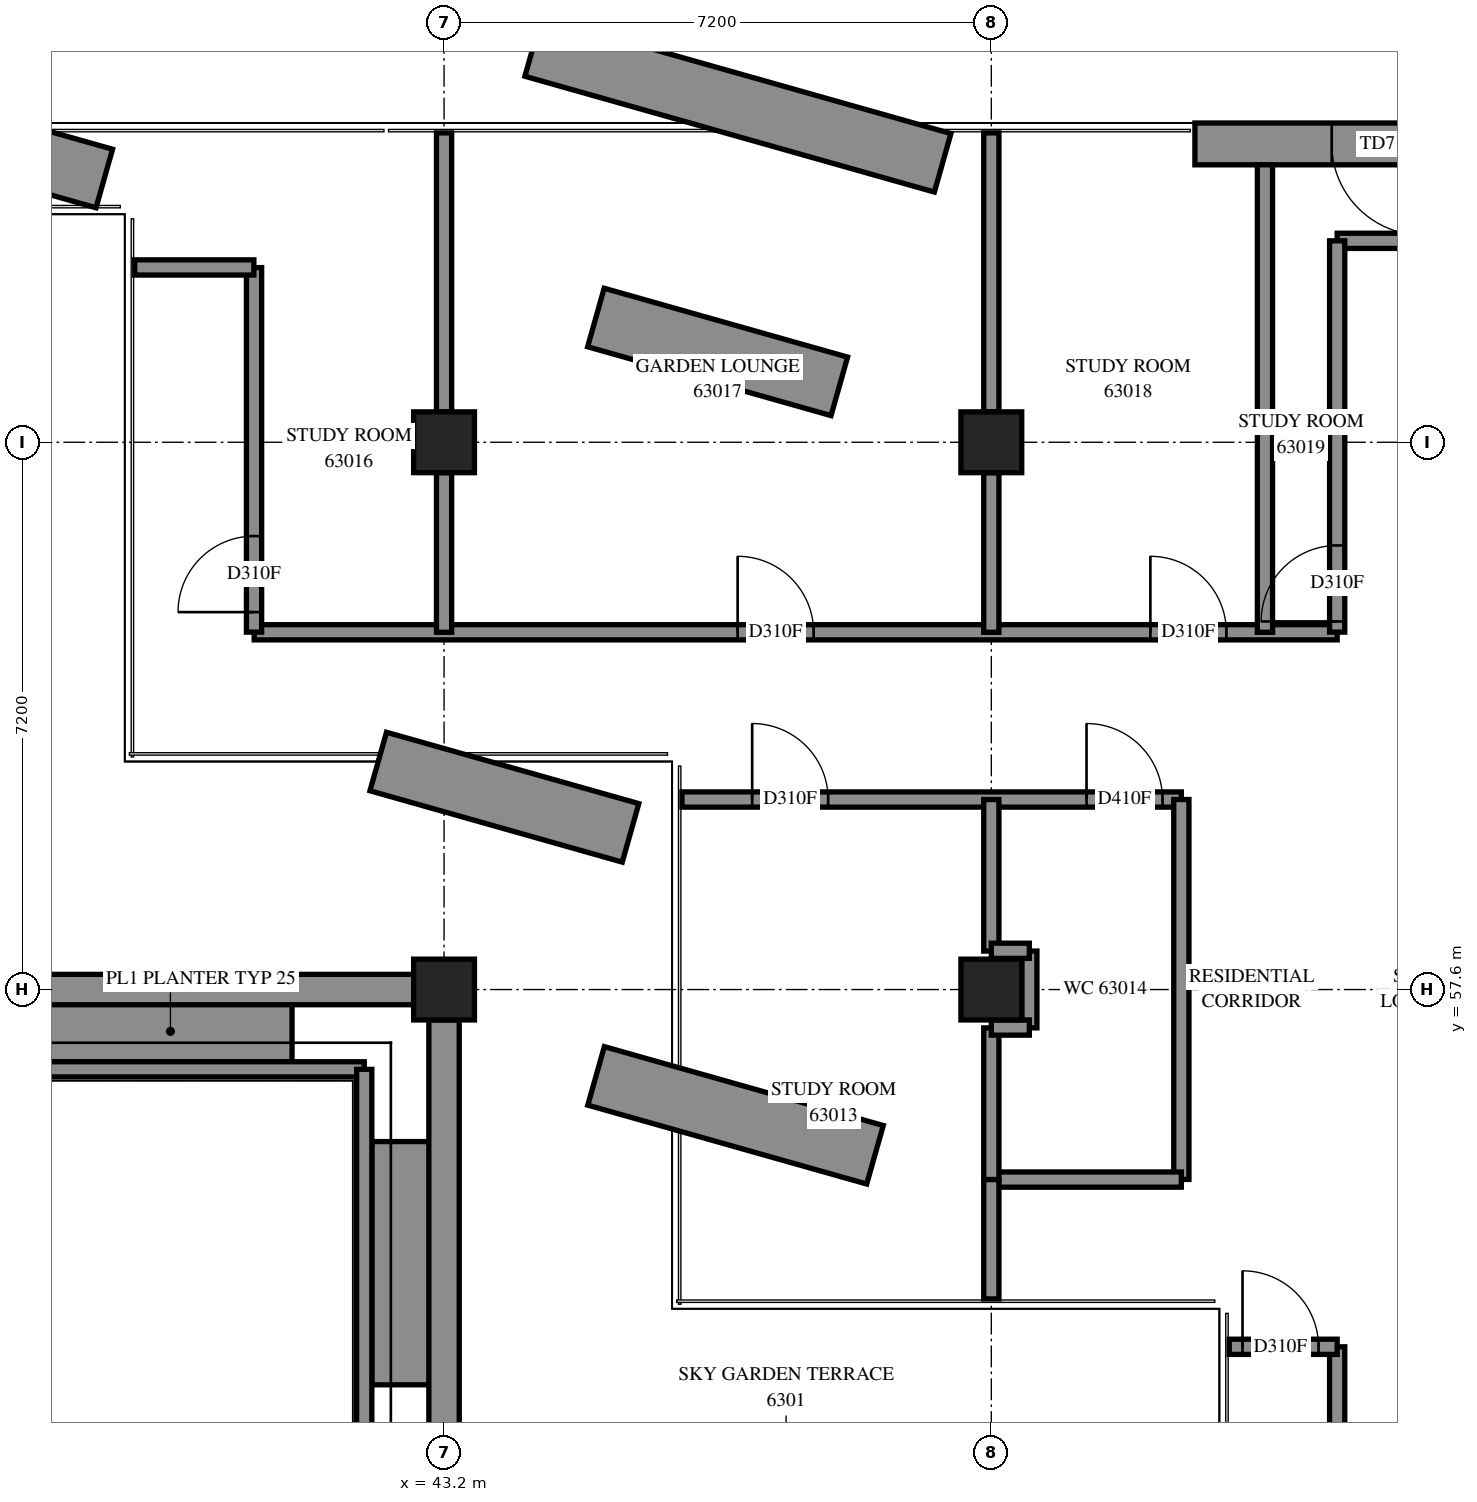
"""IFC4 building model, lengths in metres.
Left out: names, types, materials, properties, quantities, classifications, styles, units other than length and angle.
Written with IfcOpenShell. Run it as: python <this file> out.ifc"""

import sys

from ifc_helpers import new_model, si_unit, direction, frame, frame_2d, origin, origin_2d, place, context, subcontext, project, spatial, polyline, rectangle, outline, extrude, element, fill, save


model = new_model("IFC4")
c1 = context("Model", 3, precision=1e-05, world=origin(), true_north=direction((0.0, 1.0)))
c2 = subcontext(c1, "Body", "Model", "MODEL_VIEW")
j1 = project(units=[si_unit("LENGTHUNIT", "METRE"), si_unit("PLANEANGLEUNIT", "RADIAN")], contexts=[c1])
p1 = place(None, origin())
s1 = spatial("IfcSite", under=j1, at=p1, CompositionType="ELEMENT")
p2 = place(p1, origin())
s2 = spatial("IfcBuilding", under=s1, at=p2, CompositionType="ELEMENT")
p3 = place(p2, frame((0.0, 0.0, 230.4)))
s3 = spatial("IfcBuildingStorey", under=s2, at=p3, CompositionType="ELEMENT", Elevation=230.4)
for number, where, z_axis, x_axis in (
    (1, (43.2, 57.6, 0.0), (0.0, 0.0, 1.0), (1.0, 0.0, 0.0)),
    (2, (43.2, 64.8, 0.0), (0.0, 0.0, 1.0), (1.0, 0.0, 0.0)),
    (3, (50.4, 57.6, 0.0), (0.0, 0.0, 1.0), (1.0, 0.0, 0.0)),
    (4, (50.4, 64.8, 0.0), (0.0, 0.0, 1.0), (1.0, 0.0, 0.0)),
):
    element("IfcColumn", number, at=place(p3, frame(where, z_axis=z_axis, x_axis=x_axis)), inside=s3, PredefinedType="COLUMN", context=c2, shape_type="SweptSolid", body=[
        extrude(rectangle(XDim=0.8, YDim=0.8, at=origin_2d()), origin(), (0.0, 0.0, 1.0), 3.9),
    ])
p4 = place(p3, frame((56.678, 68.725, 0.0), z_axis=(0.0, 0.0, 1.0), x_axis=(-1.0, 0.0, 0.0)))
e5 = element("IfcWall", 5, at=p4, inside=s3, PredefinedType="SOLIDWALL", context=c2, shape_type="SweptSolid", body=[
    extrude(rectangle(XDim=3.6, YDim=0.55, at=frame_2d((1.8, 0.0))), origin(), (0.0, 0.0, 1.0), 3.9),
])
p5 = place(p4, frame((0.6, 0.0, 0.0)))
e6 = element("IfcOpeningElement", 6, at=p5, cuts=e5, PredefinedType="OPENING", context=c2, shape_type="SweptSolid", body=[
    extrude(rectangle(XDim=1.2, YDim=2.4, at=frame_2d((0.6, 1.2))), frame((0.0, 0.285, 0.0), z_axis=(0.0, -1.0, 0.0), x_axis=(1.0, 0.0, 0.0)), (0.0, 0.0, 1.0), 0.57),
])
for number, where, z_axis, x_axis in (
    (7, (38.0, 57.05, 0.0), (0.0, 0.0, 1.0), (1.0, 0.0, 0.0)),
    (8, (42.65, 55.6, 0.0), (0.0, 0.0, 1.0), (0.0, -1.0, 0.0)),
):
    element("IfcWall", number, at=place(p3, frame(where, z_axis=z_axis, x_axis=x_axis)), inside=s3, PredefinedType="SOLIDWALL", context=c2, shape_type="SweptSolid", body=[
        extrude(rectangle(XDim=3.2, YDim=0.8, at=frame_2d((1.6, 0.0))), origin(), (0.0, 0.0, 1.0), 0.65),
    ])
p6 = place(p3, frame((49.76, 68.477, 0.0), z_axis=(0.0, 0.0, 1.0), x_axis=(-0.9622632511, 0.2721202593, 0.0)))
e9 = element("IfcWall", 9, at=p6, inside=s3, PredefinedType="SOLIDWALL", context=c2, shape_type="SweptSolid", body=[
    extrude(rectangle(XDim=5.598, YDim=0.8, at=frame_2d((2.799, 0.0))), origin(), (0.0, 0.0, 1.0), 0.65),
])
p7 = place(p3, frame((38.73, 68.27, 0.0), z_axis=(0.0, 0.0, 1.0), x_axis=(-0.9622613389, 0.2721270213, 0.0)))
e10 = element("IfcWall", 10, at=p7, inside=s3, PredefinedType="SOLIDWALL", context=c2, shape_type="SweptSolid", body=[
    extrude(rectangle(XDim=8.241, YDim=0.8, at=frame_2d((4.12, 0.0))), origin(), (0.0, 0.0, 1.0), 0.65),
])
p8 = place(p3, frame((45.653, 59.661, 0.0), z_axis=(0.0, 0.0, 1.0), x_axis=(-0.962261063, 0.2721279968, 0.0)))
e11 = element("IfcWall", 11, at=p8, inside=s3, PredefinedType="SOLIDWALL", context=c2, shape_type="SweptSolid", body=[
    extrude(rectangle(XDim=3.45, YDim=0.8, at=frame_2d((1.725, 0.0))), origin(), (0.0, 0.0, 1.0), 0.65),
])
p9 = place(p3, frame((34.95, 56.55, 0.0), z_axis=(0.0, 0.0, 1.0), x_axis=(1.0, 0.0, 0.0)))
e12 = element("IfcWall", 12, at=p9, inside=s3, PredefinedType="SOLIDWALL", context=c2, shape_type="SweptSolid", body=[
    extrude(outline(polyline([(-0.1, -0.1), (7.1, -0.1), (7.3, 0.1), (0.1, 0.1), (-0.1, -0.1)])), origin(), (0.0, 0.0, 1.0), 4.2),
])
p10 = place(p3, frame((42.15, 56.55, 0.0), z_axis=(0.0, 0.0, 1.0), x_axis=(0.0, -1.0, 0.0)))
e13 = element("IfcWall", 13, at=p10, inside=s3, PredefinedType="SOLIDWALL", context=c2, shape_type="SweptSolid", body=[
    extrude(outline(polyline([(0.1, -0.1), (7.3, -0.1), (7.1, 0.1), (-0.1, 0.1), (0.1, -0.1)])), origin(), (0.0, 0.0, 1.0), 4.2),
])
p11 = place(p3, frame((54.95, 67.45, 0.0), z_axis=(0.0, 0.0, 1.0), x_axis=(1.0, 0.0, 0.0)))
e14 = element("IfcWall", 14, at=p11, inside=s3, PredefinedType="PARTITIONING", context=c2, shape_type="SweptSolid", body=[
    extrude(rectangle(XDim=19.7, YDim=0.2, at=frame_2d((9.85, 0.0))), origin(), (0.0, 0.0, 1.0), 3.9),
])
p12 = place(p11, frame((6.513, 0.0, 0.0)))
e15 = element("IfcOpeningElement", 15, at=p12, cuts=e14, PredefinedType="OPENING", context=c2, shape_type="SweptSolid", body=[
    extrude(rectangle(XDim=1.0, YDim=2.1, at=frame_2d((0.5, 1.05))), frame((0.0, 0.11, 0.0), z_axis=(0.0, -1.0, 0.0), x_axis=(1.0, 0.0, 0.0)), (0.0, 0.0, 1.0), 0.22),
])
p13 = place(p11, frame((13.713, 0.0, 0.0)))
e16 = element("IfcOpeningElement", 16, at=p13, cuts=e14, PredefinedType="OPENING", context=c2, shape_type="SweptSolid", body=[
    extrude(rectangle(XDim=1.0, YDim=2.1, at=frame_2d((0.5, 1.05))), frame((0.0, 0.11, 0.0), z_axis=(0.0, -1.0, 0.0), x_axis=(1.0, 0.0, 0.0)), (0.0, 0.0, 1.0), 0.22),
])
p14 = place(p3, frame((40.702, 62.3, 0.0), z_axis=(0.0, 0.0, 1.0), x_axis=(1.0, 0.0, 0.0)))
e17 = element("IfcWall", 17, at=p14, inside=s3, PredefinedType="PARTITIONING", context=c2, shape_type="SweptSolid", body=[
    extrude(rectangle(XDim=14.248, YDim=0.2, at=frame_2d((7.124, 0.0))), origin(), (0.0, 0.0, 1.0), 3.9),
])
p15 = place(p14, frame((6.361, 0.0, 0.0)))
e18 = element("IfcOpeningElement", 18, at=p15, cuts=e17, PredefinedType="OPENING", context=c2, shape_type="SweptSolid", body=[
    extrude(rectangle(XDim=1.0, YDim=2.1, at=frame_2d((0.5, 1.05))), frame((0.0, 0.11, 0.0), z_axis=(0.0, -1.0, 0.0), x_axis=(1.0, 0.0, 0.0)), (0.0, 0.0, 1.0), 0.22),
])
p16 = place(p14, frame((11.79, 0.0, 0.0)))
e19 = element("IfcOpeningElement", 19, at=p16, cuts=e17, PredefinedType="OPENING", context=c2, shape_type="SweptSolid", body=[
    extrude(rectangle(XDim=1.0, YDim=2.1, at=frame_2d((0.5, 1.05))), frame((0.0, 0.11, 0.0), z_axis=(0.0, -1.0, 0.0), x_axis=(1.0, 0.0, 0.0)), (0.0, 0.0, 1.0), 0.22),
])
p17 = place(p3, frame((54.0, 62.3, 0.0), z_axis=(0.0, 0.0, 1.0), x_axis=(0.0, 1.0, 0.0)))
e20 = element("IfcWall", 20, at=p17, inside=s3, PredefinedType="PARTITIONING", context=c2, shape_type="SweptSolid", body=[
    extrude(rectangle(XDim=6.15, YDim=0.2, at=frame_2d((3.075, 0.0))), origin(), (0.0, 0.0, 1.0), 3.9),
])
p18 = place(p3, frame((46.33, 60.1, 0.0), z_axis=(0.0, 0.0, 1.0), x_axis=(1.0, 0.0, 0.0)))
e21 = element("IfcWall", 21, at=p18, inside=s3, PredefinedType="PARTITIONING", context=c2, shape_type="SweptSolid", body=[
    extrude(rectangle(XDim=6.57, YDim=0.2, at=frame_2d((3.285, 0.0))), origin(), (0.0, 0.0, 1.0), 3.9),
])
p19 = place(p18, frame((0.924, 0.0, 0.0)))
e22 = element("IfcOpeningElement", 22, at=p19, cuts=e21, PredefinedType="OPENING", context=c2, shape_type="SweptSolid", body=[
    extrude(rectangle(XDim=1.0, YDim=2.1, at=frame_2d((0.5, 1.05))), frame((0.0, 0.11, 0.0), z_axis=(0.0, -1.0, 0.0), x_axis=(1.0, 0.0, 0.0)), (0.0, 0.0, 1.0), 0.22),
])
p20 = place(p18, frame((5.322, 0.0, 0.0)))
e23 = element("IfcOpeningElement", 23, at=p20, cuts=e21, PredefinedType="OPENING", context=c2, shape_type="SweptSolid", body=[
    extrude(rectangle(XDim=1.0, YDim=2.1, at=frame_2d((0.5, 1.05))), frame((0.0, 0.11, 0.0), z_axis=(0.0, -1.0, 0.0), x_axis=(1.0, 0.0, 0.0)), (0.0, 0.0, 1.0), 0.22),
])
p21 = place(p3, frame((54.95, 47.75, 0.0), z_axis=(0.0, 0.0, 1.0), x_axis=(0.0, 1.0, 0.0)))
e24 = element("IfcWall", 24, at=p21, inside=s3, PredefinedType="PARTITIONING", context=c2, shape_type="SweptSolid", body=[
    extrude(rectangle(XDim=5.15, YDim=0.2, at=frame_2d((2.575, 0.0))), origin(), (0.0, 0.0, 1.0), 3.9),
])
p22 = place(p3, frame((54.95, 62.302, 0.0), z_axis=(0.0, 0.0, 1.0), x_axis=(0.0, 1.0, 0.0)))
e25 = element("IfcWall", 25, at=p22, inside=s3, PredefinedType="PARTITIONING", context=c2, shape_type="SweptSolid", body=[
    extrude(rectangle(XDim=5.148, YDim=0.2, at=frame_2d((2.574, 0.0))), origin(), (0.0, 0.0, 1.0), 3.9),
])
p23 = place(p22, frame((0.141, 0.0, 0.0)))
e26 = element("IfcOpeningElement", 26, at=p23, cuts=e25, PredefinedType="OPENING", context=c2, shape_type="SweptSolid", body=[
    extrude(rectangle(XDim=1.0, YDim=2.1, at=frame_2d((0.5, 1.05))), frame((0.0, 0.11, 0.0), z_axis=(0.0, -1.0, 0.0), x_axis=(1.0, 0.0, 0.0)), (0.0, 0.0, 1.0), 0.22),
])
p24 = place(p3, frame((52.9, 55.102, 0.0), z_axis=(0.0, 0.0, 1.0), x_axis=(0.0, 1.0, 0.0)))
e27 = element("IfcWall", 27, at=p24, inside=s3, PredefinedType="PARTITIONING", context=c2, shape_type="SweptSolid", body=[
    extrude(rectangle(XDim=4.998, YDim=0.2, at=frame_2d((2.499, 0.0))), origin(), (0.0, 0.0, 1.0), 3.9),
])
p25 = place(p3, frame((40.7, 62.302, 0.0), z_axis=(0.0, 0.0, 1.0), x_axis=(0.0, 1.0, 0.0)))
e28 = element("IfcWall", 28, at=p25, inside=s3, PredefinedType="PARTITIONING", context=c2, shape_type="SweptSolid", body=[
    extrude(rectangle(XDim=4.796, YDim=0.2, at=frame_2d((2.398, 0.0))), origin(), (0.0, 0.0, 1.0), 3.9),
])
p26 = place(p25, frame((0.264, 0.0, 0.0)))
e29 = element("IfcOpeningElement", 29, at=p26, cuts=e28, PredefinedType="OPENING", context=c2, shape_type="SweptSolid", body=[
    extrude(rectangle(XDim=1.0, YDim=2.1, at=frame_2d((0.5, 1.05))), frame((0.0, 0.11, 0.0), z_axis=(0.0, -1.0, 0.0), x_axis=(1.0, 0.0, 0.0)), (0.0, 0.0, 1.0), 0.22),
])
for number, where, z_axis, x_axis in (
    (30, (43.2, 65.2, 0.0), (0.0, 0.0, 1.0), (0.0, 1.0, 0.0)),
    (31, (50.4, 65.2, 0.0), (0.0, 0.0, 1.0), (0.0, 1.0, 0.0)),
):
    element("IfcWall", number, at=place(p3, frame(where, z_axis=z_axis, x_axis=x_axis)), inside=s3, PredefinedType="PARTITIONING", context=c2, shape_type="SweptSolid", body=[
        extrude(rectangle(XDim=3.67, YDim=0.2, at=frame_2d((1.835, 0.0))), origin(), (0.0, 0.0, 1.0), 3.9),
    ])
p27 = place(p3, frame((50.4, 55.1, 0.0), z_axis=(0.0, 0.0, 1.0), x_axis=(1.0, 0.0, 0.0)))
e32 = element("IfcWall", 32, at=p27, inside=s3, PredefinedType="PARTITIONING", context=c2, shape_type="SweptSolid", body=[
    extrude(rectangle(XDim=2.5, YDim=0.2, at=frame_2d((1.25, 0.0))), origin(), (0.0, 0.0, 1.0), 3.9),
])
for number, where, z_axis, x_axis in (
    (33, (43.2, 62.3, 0.0), (0.0, 0.0, 1.0), (0.0, 1.0, 0.0)),
    (34, (50.4, 62.3, 0.0), (0.0, 0.0, 1.0), (0.0, 1.0, 0.0)),
):
    element("IfcWall", number, at=place(p3, frame(where, z_axis=z_axis, x_axis=x_axis)), inside=s3, PredefinedType="PARTITIONING", context=c2, shape_type="SweptSolid", body=[
        extrude(rectangle(XDim=2.1, YDim=0.2, at=frame_2d((1.05, 0.0))), origin(), (0.0, 0.0, 1.0), 3.9),
    ])
p28 = place(p3, frame((50.4, 55.1, 0.0), z_axis=(0.0, 0.0, 1.0), x_axis=(0.0, 1.0, 0.0)))
e35 = element("IfcWall", 35, at=p28, inside=s3, PredefinedType="PARTITIONING", context=c2, shape_type="SweptSolid", body=[
    extrude(rectangle(XDim=1.996, YDim=0.2, at=frame_2d((0.998, 0.0))), origin(), (0.0, 0.0, 1.0), 3.9),
])
p29 = place(p3, frame((50.4, 58.106, 0.0), z_axis=(0.0, 0.0, 1.0), x_axis=(0.0, 1.0, 0.0)))
e36 = element("IfcWall", 36, at=p29, inside=s3, PredefinedType="PARTITIONING", context=c2, shape_type="SweptSolid", body=[
    extrude(rectangle(XDim=1.994, YDim=0.2, at=frame_2d((0.997, 0.0))), origin(), (0.0, 0.0, 1.0), 3.9),
])
p30 = place(p3, frame((50.4, 53.53, 0.0), z_axis=(0.0, 0.0, 1.0), x_axis=(0.0, 1.0, 0.0)))
e37 = element("IfcWall", 37, at=p30, inside=s3, PredefinedType="PARTITIONING", context=c2, shape_type="SweptSolid", body=[
    extrude(rectangle(XDim=1.57, YDim=0.2, at=frame_2d((0.785, 0.0))), origin(), (0.0, 0.0, 1.0), 3.9),
])
p31 = place(p3, frame((39.13, 67.1, 0.0), z_axis=(0.0, 0.0, 1.0), x_axis=(1.0, 0.0, 0.0)))
e38 = element("IfcWall", 38, at=p31, inside=s3, PredefinedType="PARTITIONING", context=c2, shape_type="SweptSolid", body=[
    extrude(rectangle(XDim=1.568, YDim=0.2, at=frame_2d((0.784, 0.0))), origin(), (0.0, 0.0, 1.0), 3.9),
])
p32 = place(p3, frame((53.53, 52.9, 0.0), z_axis=(0.0, 0.0, 1.0), x_axis=(1.0, 0.0, 0.0)))
e39 = element("IfcWall", 39, at=p32, inside=s3, PredefinedType="PARTITIONING", context=c2, shape_type="SweptSolid", body=[
    extrude(rectangle(XDim=1.42, YDim=0.2, at=frame_2d((0.71, 0.0))), origin(), (0.0, 0.0, 1.0), 3.9),
])
p33 = place(p32, frame((0.175, 0.0, 0.0)))
e40 = element("IfcOpeningElement", 40, at=p33, cuts=e39, PredefinedType="OPENING", context=c2, shape_type="SweptSolid", body=[
    extrude(rectangle(XDim=1.0, YDim=2.1, at=frame_2d((0.5, 1.05))), frame((0.0, 0.11, 0.0), z_axis=(0.0, -1.0, 0.0), x_axis=(1.0, 0.0, 0.0)), (0.0, 0.0, 1.0), 0.22),
])
p34 = place(p3, frame((50.9, 57.096, 0.0), z_axis=(0.0, 0.0, 1.0), x_axis=(0.0, 1.0, 0.0)))
e41 = element("IfcWall", 41, at=p34, inside=s3, PredefinedType="PARTITIONING", context=c2, shape_type="SweptSolid", body=[
    extrude(rectangle(XDim=1.01, YDim=0.2, at=frame_2d((0.505, 0.0))), origin(), (0.0, 0.0, 1.0), 3.9),
])
for number, where, z_axis, x_axis in (
    (42, (50.4, 58.11, 0.0), (0.0, 0.0, 1.0), (1.0, 0.0, 0.0)),
    (43, (50.4, 57.1, 0.0), (0.0, 0.0, 1.0), (1.0, 0.0, 0.0)),
):
    element("IfcWall", number, at=place(p3, frame(where, z_axis=z_axis, x_axis=x_axis)), inside=s3, PredefinedType="PARTITIONING", context=c2, shape_type="SweptSolid", body=[
        extrude(rectangle(XDim=0.5, YDim=0.2, at=frame_2d((0.25, 0.0))), origin(), (0.0, 0.0, 1.0), 3.9),
    ])
p35 = place(p3, frame((48.4, 65.536, 0.0), z_axis=(0.0, 0.0, 1.0), x_axis=(-0.962259808, 0.2721324346, 0.0)))
e44 = element("IfcWall", 44, at=p35, inside=s3, PredefinedType="SOLIDWALL", context=c2, shape_type="SweptSolid", body=[
    extrude(outline(polyline([(0.0, -0.4), (3.328, -0.4), (3.328, 0.4), (0.0, 0.4), (0.0, -0.4)])), origin(), (0.0, 0.0, 1.0), 0.65),
])
p36 = place(p3, frame((48.869, 55.426, 0.0), z_axis=(0.0, 0.0, 1.0), x_axis=(-0.9622616458, 0.2721259361, 0.0)))
e45 = element("IfcWall", 45, at=p36, inside=s3, PredefinedType="SOLIDWALL", context=c2, shape_type="SweptSolid", body=[
    extrude(outline(polyline([(0.0, -0.4), (3.813, -0.4), (3.813, 0.4), (0.0, 0.4), (0.0, -0.4)])), origin(), (0.0, 0.0, 1.0), 0.65),
])
p37 = place(p5, origin())
e46 = element("IfcDoor", 46, at=p37, inside=s3, OperationType="SINGLE_SWING_LEFT", PredefinedType="DOOR", context=c2, shape_type="SweptSolid", body=[
    extrude(rectangle(XDim=1.2, YDim=2.4, at=frame_2d((0.6, 1.2))), frame((0.0, 0.025, 0.0), z_axis=(0.0, -1.0, 0.0), x_axis=(1.0, 0.0, 0.0)), (0.0, 0.0, 1.0), 0.05),
])
fill(e6, e46)
p38 = place(p33, origin())
e47 = element("IfcDoor", 47, at=p38, inside=s3, OperationType="SINGLE_SWING_RIGHT", PredefinedType="DOOR", context=c2, shape_type="SweptSolid", body=[
    extrude(rectangle(XDim=1.0, YDim=2.1, at=frame_2d((0.5, 1.05))), frame((0.0, 0.025, 0.0), z_axis=(0.0, -1.0, 0.0), x_axis=(1.0, 0.0, 0.0)), (0.0, 0.0, 1.0), 0.05),
])
fill(e40, e47)
p39 = place(p19, origin())
e48 = element("IfcDoor", 48, at=p39, inside=s3, OperationType="SINGLE_SWING_RIGHT", PredefinedType="DOOR", context=c2, shape_type="SweptSolid", body=[
    extrude(rectangle(XDim=1.0, YDim=2.1, at=frame_2d((0.5, 1.05))), frame((0.0, 0.025, 0.0), z_axis=(0.0, -1.0, 0.0), x_axis=(1.0, 0.0, 0.0)), (0.0, 0.0, 1.0), 0.05),
])
fill(e22, e48)
p40 = place(p20, origin())
e49 = element("IfcDoor", 49, at=p40, inside=s3, OperationType="SINGLE_SWING_LEFT", PredefinedType="DOOR", context=c2, shape_type="SweptSolid", body=[
    extrude(rectangle(XDim=1.0, YDim=2.1, at=frame_2d((0.5, 1.05))), frame((0.0, 0.025, 0.0), z_axis=(0.0, -1.0, 0.0), x_axis=(1.0, 0.0, 0.0)), (0.0, 0.0, 1.0), 0.05),
])
fill(e23, e49)
p41 = place(p26, origin())
e50 = element("IfcDoor", 50, at=p41, inside=s3, OperationType="SINGLE_SWING_LEFT", PredefinedType="DOOR", context=c2, shape_type="SweptSolid", body=[
    extrude(rectangle(XDim=1.0, YDim=2.1, at=frame_2d((0.5, 1.05))), frame((0.0, 0.025, 0.0), z_axis=(0.0, -1.0, 0.0), x_axis=(1.0, 0.0, 0.0)), (0.0, 0.0, 1.0), 0.05),
])
fill(e29, e50)
p42 = place(p15, origin())
e51 = element("IfcDoor", 51, at=p42, inside=s3, OperationType="SINGLE_SWING_RIGHT", PredefinedType="DOOR", context=c2, shape_type="SweptSolid", body=[
    extrude(rectangle(XDim=1.0, YDim=2.1, at=frame_2d((0.5, 1.05))), frame((0.0, 0.025, 0.0), z_axis=(0.0, -1.0, 0.0), x_axis=(1.0, 0.0, 0.0)), (0.0, 0.0, 1.0), 0.05),
])
fill(e18, e51)
p43 = place(p16, origin())
e52 = element("IfcDoor", 52, at=p43, inside=s3, OperationType="SINGLE_SWING_RIGHT", PredefinedType="DOOR", context=c2, shape_type="SweptSolid", body=[
    extrude(rectangle(XDim=1.0, YDim=2.1, at=frame_2d((0.5, 1.05))), frame((0.0, 0.025, 0.0), z_axis=(0.0, -1.0, 0.0), x_axis=(1.0, 0.0, 0.0)), (0.0, 0.0, 1.0), 0.05),
])
fill(e19, e52)
p44 = place(p23, origin())
e53 = element("IfcDoor", 53, at=p44, inside=s3, OperationType="SINGLE_SWING_LEFT", PredefinedType="DOOR", context=c2, shape_type="SweptSolid", body=[
    extrude(rectangle(XDim=1.0, YDim=2.1, at=frame_2d((0.5, 1.05))), frame((0.0, 0.025, 0.0), z_axis=(0.0, -1.0, 0.0), x_axis=(1.0, 0.0, 0.0)), (0.0, 0.0, 1.0), 0.05),
])
fill(e26, e53)
save(model, sys.argv[1])
